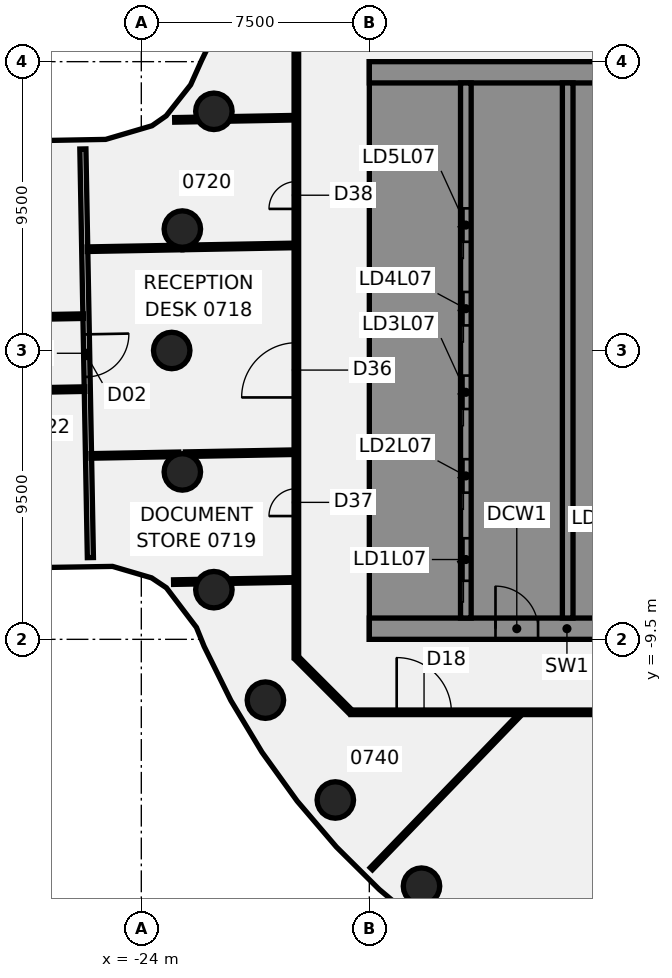
"""IFC4 building model, lengths in metres.
Left out: names, types, materials, properties, quantities, classifications, styles, units other than length and angle.
Written with IfcOpenShell. Run it as: python <this file> out.ifc"""

import sys

from ifc_helpers import new_model, si_unit, direction, frame, frame_2d, origin, origin_2d, place, context, subcontext, project, spatial, polyline, rectangle, circle, outline, extrude, element, fill, save


model = new_model("IFC4")
c1 = context("Model", 3, precision=1e-05, world=origin(), true_north=direction((0.0, 1.0)))
c2 = subcontext(c1, "Body", "Model", "MODEL_VIEW")
j1 = project(units=[si_unit("LENGTHUNIT", "METRE"), si_unit("PLANEANGLEUNIT", "RADIAN")], contexts=[c1])
p1 = place(None, origin())
s1 = spatial("IfcSite", under=j1, at=p1, CompositionType="ELEMENT")
p2 = place(p1, origin())
s2 = spatial("IfcBuilding", under=s1, at=p2, CompositionType="ELEMENT")
p3 = place(p2, frame((0.0, 0.0, 37.75)))
s3 = spatial("IfcBuildingStorey", under=s2, at=p3, CompositionType="ELEMENT", Elevation=37.75)
for number, where, z_axis, x_axis in (
    (1, (-21.613, 7.866, -0.14), (0.0, 0.0, 1.0), (1.0, 0.0, 0.0)),
    (2, (-22.651, 3.994, -0.14), (0.0, 0.0, 1.0), (1.0, 0.0, 0.0)),
    (3, (-23.0, 0.0, -0.14), (0.0, 0.0, 1.0), (1.0, 0.0, 0.0)),
    (4, (-22.651, -3.994, -0.14), (0.0, 0.0, 1.0), (1.0, 0.0, 0.0)),
    (5, (-21.613, -7.866, -0.14), (0.0, 0.0, 1.0), (1.0, 0.0, 0.0)),
    (6, (-19.919, -11.5, -0.14), (0.0, 0.0, 1.0), (1.0, 0.0, 0.0)),
    (7, (-17.619, -14.784, -0.14), (0.0, 0.0, 1.0), (1.0, 0.0, 0.0)),
    (8, (-14.784, -17.619, -0.14), (0.0, 0.0, 1.0), (1.0, 0.0, 0.0)),
):
    element("IfcColumn", number, at=place(p3, frame(where, z_axis=z_axis, x_axis=x_axis)), inside=s3, PredefinedType="COLUMN", context=c2, shape_type="SweptSolid", body=[
        extrude(circle(Radius=0.6, at=origin_2d()), origin(), (0.0, 0.0, 1.0), 3.75),
    ])
p4 = place(p3, frame((-25.922, 6.629, 0.0), z_axis=(0.0, 0.0, 1.0), x_axis=(0.018380182435, -0.999831070178, 0.0)))
e9 = element("IfcWall", 9, at=p4, inside=s3, PredefinedType="PARTITIONING", context=c2, shape_type="SweptSolid", body=[
    extrude(rectangle(XDim=13.442, YDim=0.2, at=frame_2d((6.721, 0.0))), origin(), (0.0, 0.0, 1.0), 3.01),
])
p5 = place(p4, frame((6.098, 0.0, 0.0)))
e10 = element("IfcOpeningElement", 10, at=p5, cuts=e9, PredefinedType="OPENING", context=c2, shape_type="SweptSolid", body=[
    extrude(rectangle(XDim=1.4, YDim=2.1, at=frame_2d((0.7, 1.05))), frame((0.0, 0.11, 0.0), z_axis=(0.0, -1.0, 0.0), x_axis=(1.0, 0.0, 0.0)), (0.0, 0.0, 1.0), 0.22),
])
p6 = place(p3, frame((-18.872, -10.128, 0.0), z_axis=(0.0, 0.0, 1.0), x_axis=(0.707106781187, -0.707106781187, 0.0)))
e11 = element("IfcWall", 11, at=p6, inside=s3, PredefinedType="PARTITIONING", context=c2, shape_type="SweptSolid", body=[
    extrude(rectangle(XDim=2.465, YDim=0.15, at=frame_2d((1.232, 0.0))), origin(), (0.0, 0.0, 1.0), 3.01),
])
p7 = place(p3, frame((-17.1, -11.9, 0.0), z_axis=(0.0, 0.0, 1.0), x_axis=(1.0, 0.0, 0.0)))
e12 = element("IfcWall", 12, at=p7, inside=s3, PredefinedType="PARTITIONING", context=c2, shape_type="SweptSolid", body=[
    extrude(rectangle(XDim=34.165, YDim=0.15, at=frame_2d((17.083, 0.0))), origin(), (0.0, 0.0, 1.0), 3.01),
])
p8 = place(p7, frame((16.065, 0.0, 0.0)))
e13 = element("IfcOpeningElement", 13, at=p8, cuts=e12, PredefinedType="OPENING", context=c2, shape_type="SweptSolid", body=[
    extrude(rectangle(XDim=1.8, YDim=2.1, at=frame_2d((0.9, 1.05))), frame((0.0, 0.085, 0.0), z_axis=(0.0, -1.0, 0.0), x_axis=(1.0, 0.0, 0.0)), (0.0, 0.0, 1.0), 0.17),
])
p9 = place(p7, frame((1.5, 0.0, 0.0)))
e14 = element("IfcOpeningElement", 14, at=p9, cuts=e12, PredefinedType="OPENING", context=c2, shape_type="SweptSolid", body=[
    extrude(rectangle(XDim=1.8, YDim=2.1, at=frame_2d((0.9, 1.05))), frame((0.0, 0.085, 0.0), z_axis=(0.0, -1.0, 0.0), x_axis=(1.0, 0.0, 0.0)), (0.0, 0.0, 1.0), 0.17),
])
p10 = place(p7, frame((26.617, 0.0, 0.0)))
e15 = element("IfcOpeningElement", 15, at=p10, cuts=e12, PredefinedType="OPENING", context=c2, shape_type="SweptSolid", body=[
    extrude(rectangle(XDim=1.8, YDim=2.1, at=frame_2d((0.9, 1.05))), frame((0.0, 0.085, 0.0), z_axis=(0.0, -1.0, 0.0), x_axis=(1.0, 0.0, 0.0)), (0.0, 0.0, 1.0), 0.17),
])
p11 = place(p3, frame((-29.78, 1.059, 0.0), z_axis=(0.0, 0.0, 1.0), x_axis=(0.999833060881, 0.01827157273, 0.0)))
e16 = element("IfcWall", 16, at=p11, inside=s3, PredefinedType="PARTITIONING", context=c2, shape_type="SweptSolid", body=[
    extrude(rectangle(XDim=3.875, YDim=0.15, at=frame_2d((1.938, 0.0))), origin(), (0.0, 0.0, 1.0), 3.01),
])
p12 = place(p3, frame((-43.714, -1.596, 0.0), z_axis=(0.0, 0.0, 1.0), x_axis=(0.999833878459, 0.018226779355, 0.0)))
e17 = element("IfcWall", 17, at=p12, inside=s3, PredefinedType="PARTITIONING", context=c2, shape_type="SweptSolid", body=[
    extrude(rectangle(XDim=17.855, YDim=0.15, at=frame_2d((8.927, 0.0))), origin(), (0.0, 0.0, 1.0), 3.01),
])
p13 = place(p12, frame((11.79, 0.0, 0.0)))
e18 = element("IfcOpeningElement", 18, at=p13, cuts=e17, PredefinedType="OPENING", context=c2, shape_type="SweptSolid", body=[
    extrude(rectangle(XDim=0.9, YDim=2.1, at=frame_2d((0.45, 1.05))), frame((0.0, 0.085, 0.0), z_axis=(0.0, -1.0, 0.0), x_axis=(1.0, 0.0, 0.0)), (0.0, 0.0, 1.0), 0.17),
])
p14 = place(p12, frame((5.19, 0.0, 0.0)))
e19 = element("IfcOpeningElement", 19, at=p14, cuts=e17, PredefinedType="OPENING", context=c2, shape_type="SweptSolid", body=[
    extrude(rectangle(XDim=0.9, YDim=2.1, at=frame_2d((0.45, 1.05))), frame((0.0, 0.085, 0.0), z_axis=(0.0, -1.0, 0.0), x_axis=(1.0, 0.0, 0.0)), (0.0, 0.0, 1.0), 0.17),
])
p15 = place(p3, frame((-25.776, 3.332, 0.0), z_axis=(0.0, 0.0, 1.0), x_axis=(0.999834076392, 0.018215918464, 0.0)))
e20 = element("IfcWall", 20, at=p15, inside=s3, PredefinedType="PARTITIONING", context=c2, shape_type="SweptSolid", body=[
    extrude(rectangle(XDim=3.109, YDim=0.15, at=frame_2d((1.555, 0.0))), origin(), (0.0, 0.0, 1.0), 3.01),
])
p16 = place(p3, frame((-22.632, 3.389, 0.0), z_axis=(0.0, 0.0, 1.0), x_axis=(0.999834091985, 0.01821506258, 0.0)))
e21 = element("IfcWall", 21, at=p16, inside=s3, PredefinedType="PARTITIONING", context=c2, shape_type="SweptSolid", body=[
    extrude(rectangle(XDim=3.672, YDim=0.15, at=frame_2d((1.836, 0.0))), origin(), (0.0, 0.0, 1.0), 3.01),
])
p17 = place(p3, frame((-25.652, -3.467, 0.0), z_axis=(0.0, 0.0, 1.0), x_axis=(0.999834723768, 0.01818035061, 0.0)))
e22 = element("IfcWall", 22, at=p17, inside=s3, PredefinedType="PARTITIONING", context=c2, shape_type="SweptSolid", body=[
    extrude(rectangle(XDim=2.887, YDim=0.15, at=frame_2d((1.444, 0.0))), origin(), (0.0, 0.0, 1.0), 3.01),
])
p18 = place(p3, frame((-22.55, -3.411, 0.0), z_axis=(0.0, 0.0, 1.0), x_axis=(0.999833986919, 0.018220828811, 0.0)))
e23 = element("IfcWall", 23, at=p18, inside=s3, PredefinedType="PARTITIONING", context=c2, shape_type="SweptSolid", body=[
    extrude(rectangle(XDim=3.591, YDim=0.15, at=frame_2d((1.795, 0.0))), origin(), (0.0, 0.0, 1.0), 3.01),
])
p19 = place(p3, frame((-22.938, -7.618, 0.0), z_axis=(0.0, 0.0, 1.0), x_axis=(0.999837513229, 0.01802629026, 0.0)))
e24 = element("IfcWall", 24, at=p19, inside=s3, PredefinedType="PARTITIONING", context=c2, shape_type="SweptSolid", body=[
    extrude(rectangle(XDim=0.786, YDim=0.15, at=frame_2d((0.393, 0.0))), origin(), (0.0, 0.0, 1.0), 3.01),
])
p20 = place(p3, frame((-21.079, -7.584, 0.0), z_axis=(0.0, 0.0, 1.0), x_axis=(0.999836384885, 0.018088766124, 0.0)))
e25 = element("IfcWall", 25, at=p20, inside=s3, PredefinedType="PARTITIONING", context=c2, shape_type="SweptSolid", body=[
    extrude(rectangle(XDim=2.119, YDim=0.15, at=frame_2d((1.06, 0.0))), origin(), (0.0, 0.0, 1.0), 3.01),
])
p21 = place(p3, frame((-22.903, 7.585, 0.0), z_axis=(0.0, 0.0, 1.0), x_axis=(0.999834536949, 0.018190621855, 0.0)))
e26 = element("IfcWall", 26, at=p21, inside=s3, PredefinedType="PARTITIONING", context=c2, shape_type="SweptSolid", body=[
    extrude(rectangle(XDim=0.752, YDim=0.15, at=frame_2d((0.376, 0.0))), origin(), (0.0, 0.0, 1.0), 3.01),
])
p22 = place(p3, frame((-21.069, 7.618, 0.0), z_axis=(0.0, 0.0, 1.0), x_axis=(0.999832834064, 0.018283980067, 0.0)))
e27 = element("IfcWall", 27, at=p22, inside=s3, PredefinedType="PARTITIONING", context=c2, shape_type="SweptSolid", body=[
    extrude(rectangle(XDim=2.11, YDim=0.15, at=frame_2d((1.055, 0.0))), origin(), (0.0, 0.0, 1.0), 3.01),
])
p23 = place(p3, frame((-16.434, -17.044, 0.0), z_axis=(0.0, 0.0, 1.0), x_axis=(0.694105968041, 0.719872839556, 0.0)))
e28 = element("IfcWall", 28, at=p23, inside=s3, PredefinedType="PARTITIONING", context=c2, shape_type="SweptSolid", body=[
    extrude(rectangle(XDim=7.021, YDim=0.1, at=frame_2d((3.51, 0.0))), origin(), (0.0, 0.0, 1.0), 3.01),
])
p24 = place(p3, frame((-18.9, -10.1, 0.0), z_axis=(0.0, 0.0, 1.0), x_axis=(0.0, 1.0, 0.0)))
e29 = element("IfcWall", 29, at=p24, inside=s3, PredefinedType="PARTITIONING", context=c2, shape_type="SweptSolid", body=[
    extrude(rectangle(XDim=20.2, YDim=0.15, at=frame_2d((10.1, 0.0))), origin(), (0.0, 0.0, 1.0), 3.01),
])
p25 = place(p24, frame((8.556, 0.0, 0.0)))
e30 = element("IfcOpeningElement", 30, at=p25, cuts=e29, PredefinedType="OPENING", context=c2, shape_type="SweptSolid", body=[
    extrude(rectangle(XDim=1.8, YDim=2.1, at=frame_2d((0.9, 1.05))), frame((0.0, 0.085, 0.0), z_axis=(0.0, -1.0, 0.0), x_axis=(1.0, 0.0, 0.0)), (0.0, 0.0, 1.0), 0.17),
])
p26 = place(p24, frame((4.655, 0.0, 0.0)))
e31 = element("IfcOpeningElement", 31, at=p26, cuts=e29, PredefinedType="OPENING", context=c2, shape_type="SweptSolid", body=[
    extrude(rectangle(XDim=0.9, YDim=2.1, at=frame_2d((0.45, 1.05))), frame((0.0, 0.085, 0.0), z_axis=(0.0, -1.0, 0.0), x_axis=(1.0, 0.0, 0.0)), (0.0, 0.0, 1.0), 0.17),
])
p27 = place(p24, frame((14.757, 0.0, 0.0)))
e32 = element("IfcOpeningElement", 32, at=p27, cuts=e29, PredefinedType="OPENING", context=c2, shape_type="SweptSolid", body=[
    extrude(rectangle(XDim=0.9, YDim=2.1, at=frame_2d((0.45, 1.05))), frame((0.0, 0.085, 0.0), z_axis=(0.0, -1.0, 0.0), x_axis=(1.0, 0.0, 0.0)), (0.0, 0.0, 1.0), 0.17),
])
p28 = place(p3, frame((-16.5, -9.15, 0.0), z_axis=(0.0, 0.0, 1.0), x_axis=(1.0, 0.0, 0.0)))
e33 = element("IfcWall", 33, at=p28, inside=s3, PredefinedType="SHEAR", context=c2, shape_type="SweptSolid", body=[
    extrude(rectangle(XDim=13.0, YDim=0.7, at=frame_2d((6.5, 0.0))), origin(), (0.0, 0.0, 1.0), 3.61),
])
p29 = place(p28, frame((4.15, 0.0, 0.0)))
e34 = element("IfcOpeningElement", 34, at=p29, cuts=e33, PredefinedType="OPENING", context=c2, shape_type="SweptSolid", body=[
    extrude(rectangle(XDim=1.4, YDim=2.1, at=frame_2d((0.7, 1.05))), frame((0.0, 0.36, 0.0), z_axis=(0.0, -1.0, 0.0), x_axis=(1.0, 0.0, 0.0)), (0.0, 0.0, 1.0), 0.72),
])
p30 = place(p28, frame((10.125, 0.0, 0.0)))
e35 = element("IfcOpeningElement", 35, at=p30, cuts=e33, PredefinedType="OPENING", context=c2, shape_type="SweptSolid", body=[
    extrude(rectangle(XDim=1.4, YDim=2.1, at=frame_2d((0.7, 1.05))), frame((0.0, 0.36, 0.0), z_axis=(0.0, -1.0, 0.0), x_axis=(1.0, 0.0, 0.0)), (0.0, 0.0, 1.0), 0.72),
])
p31 = place(p3, origin())
e36 = element("IfcWall", 36, at=p31, inside=s3, PredefinedType="SHEAR", context=c2, shape_type="SweptSolid", body=[
    extrude(outline(polyline([(-13.5, -8.8), (-13.5, -8.125), (-15.8, -8.125), (-15.8, -5.625), (-13.5, -5.625), (-13.5, -5.375), (-15.8, -5.375), (-15.8, -2.875), (-13.5, -2.875), (-13.5, -2.625), (-15.8, -2.625), (-15.8, -0.125), (-13.5, -0.125), (-13.5, 0.125), (-15.8, 0.125), (-15.8, 2.625), (-13.5, 2.625), (-13.5, 2.875), (-15.8, 2.875), (-15.8, 5.375), (-13.5, 5.375), (-13.5, 5.625), (-15.8, 5.625), (-15.8, 8.125), (-13.5, 8.125), (-13.5, 8.8), (-15.8, 8.8), (-16.5, 8.8), (-16.5, -8.8), (-15.8, -8.8), (-13.5, -8.8)])), origin(), (0.0, 0.0, 1.0), 3.61),
])
p32 = place(p3, frame((-16.5, 9.15, 0.0), z_axis=(0.0, 0.0, 1.0), x_axis=(1.0, 0.0, 0.0)))
e37 = element("IfcWall", 37, at=p32, inside=s3, PredefinedType="SHEAR", context=c2, shape_type="SweptSolid", body=[
    extrude(rectangle(XDim=13.0, YDim=0.7, at=frame_2d((6.5, 0.0))), origin(), (0.0, 0.0, 1.0), 3.61),
])
p33 = place(p3, origin())
e38 = element("IfcWall", 38, at=p33, inside=s3, PredefinedType="SHEAR", context=c2, shape_type="SweptSolid", body=[
    extrude(outline(polyline([(-9.8, -5.375), (-9.8, -5.625), (-7.5, -5.625), (-7.15, -5.625), (-7.15, 8.8), (-7.5, 8.8), (-9.8, 8.8), (-9.8, 8.125), (-7.5, 8.125), (-7.5, 5.625), (-9.8, 5.625), (-9.8, 5.375), (-7.5, 5.375), (-7.5, 2.875), (-9.8, 2.875), (-9.8, 2.625), (-7.5, 2.625), (-7.5, 0.125), (-9.8, 0.125), (-9.8, -0.125), (-7.5, -0.125), (-7.5, -2.625), (-9.8, -2.625), (-9.8, -2.875), (-7.5, -2.875), (-7.5, -5.375), (-9.8, -5.375)])), origin(), (0.0, 0.0, 1.0), 3.61),
])
p34 = place(p3, origin())
e39 = element("IfcWall", 39, at=p34, inside=s3, PredefinedType="SHEAR", context=c2, shape_type="SweptSolid", body=[
    extrude(outline(polyline([(-7.5, -8.125), (-9.55, -8.125), (-9.55, -5.625), (-9.8, -5.625), (-9.8, -8.125), (-9.8, -8.8), (-7.5, -8.8), (-7.5, -8.125)])), origin(), (0.0, 0.0, 1.0), 3.61),
])
p35 = place(p3, frame((-13.325, -8.8, 0.0), z_axis=(0.0, 0.0, 1.0), x_axis=(0.0, 1.0, 0.0)))
e40 = element("IfcWall", 40, at=p35, inside=s3, PredefinedType="SHEAR", context=c2, shape_type="SweptSolid", body=[
    extrude(rectangle(XDim=17.6, YDim=0.35, at=frame_2d((8.8, 0.0))), origin(), (0.0, 0.0, 1.0), 3.61),
])
p36 = place(p35, frame((1.225, 0.0, 0.0)))
e41 = element("IfcOpeningElement", 41, at=p36, cuts=e40, PredefinedType="OPENING", context=c2, shape_type="SweptSolid", body=[
    extrude(rectangle(XDim=1.4, YDim=2.1, at=frame_2d((0.7, 1.05))), frame((0.0, 0.185, 0.0), z_axis=(0.0, -1.0, 0.0), x_axis=(1.0, 0.0, 0.0)), (0.0, 0.0, 1.0), 0.37),
])
p37 = place(p35, frame((4.125, 0.0, 0.0)))
e42 = element("IfcOpeningElement", 42, at=p37, cuts=e40, PredefinedType="OPENING", context=c2, shape_type="SweptSolid", body=[
    extrude(rectangle(XDim=1.1, YDim=2.1, at=frame_2d((0.55, 1.05))), frame((0.0, 0.185, 0.0), z_axis=(0.0, -1.0, 0.0), x_axis=(1.0, 0.0, 0.0)), (0.0, 0.0, 1.0), 0.37),
])
p38 = place(p35, frame((6.875, 0.0, 0.0)))
e43 = element("IfcOpeningElement", 43, at=p38, cuts=e40, PredefinedType="OPENING", context=c2, shape_type="SweptSolid", body=[
    extrude(rectangle(XDim=1.1, YDim=2.1, at=frame_2d((0.55, 1.05))), frame((0.0, 0.185, 0.0), z_axis=(0.0, -1.0, 0.0), x_axis=(1.0, 0.0, 0.0)), (0.0, 0.0, 1.0), 0.37),
])
p39 = place(p35, frame((9.625, 0.0, 0.0)))
e44 = element("IfcOpeningElement", 44, at=p39, cuts=e40, PredefinedType="OPENING", context=c2, shape_type="SweptSolid", body=[
    extrude(rectangle(XDim=1.1, YDim=2.1, at=frame_2d((0.55, 1.05))), frame((0.0, 0.185, 0.0), z_axis=(0.0, -1.0, 0.0), x_axis=(1.0, 0.0, 0.0)), (0.0, 0.0, 1.0), 0.37),
])
p40 = place(p35, frame((12.375, 0.0, 0.0)))
e45 = element("IfcOpeningElement", 45, at=p40, cuts=e40, PredefinedType="OPENING", context=c2, shape_type="SweptSolid", body=[
    extrude(rectangle(XDim=1.1, YDim=2.1, at=frame_2d((0.55, 1.05))), frame((0.0, 0.185, 0.0), z_axis=(0.0, -1.0, 0.0), x_axis=(1.0, 0.0, 0.0)), (0.0, 0.0, 1.0), 0.37),
])
p41 = place(p3, frame((-9.975, -8.8, 0.0), z_axis=(0.0, 0.0, 1.0), x_axis=(0.0, 1.0, 0.0)))
e46 = element("IfcWall", 46, at=p41, inside=s3, PredefinedType="SHEAR", context=c2, shape_type="SweptSolid", body=[
    extrude(rectangle(XDim=17.6, YDim=0.35, at=frame_2d((8.8, 0.0))), origin(), (0.0, 0.0, 1.0), 3.61),
])
p42 = place(p5, origin())
e47 = element("IfcDoor", 47, at=p42, inside=s3, OperationType="DOUBLE_DOOR_SINGLE_SWING", PredefinedType="DOOR", context=c2, shape_type="SweptSolid", body=[
    extrude(rectangle(XDim=1.4, YDim=2.1, at=frame_2d((0.7, 1.05))), frame((0.0, 0.025, 0.0), z_axis=(0.0, -1.0, 0.0), x_axis=(1.0, 0.0, 0.0)), (0.0, 0.0, 1.0), 0.05),
])
fill(e10, e47)
p43 = place(p9, frame((1.8, 0.0, 0.0), z_axis=(0.0, 0.0, 1.0), x_axis=(-1.0, 0.0, 0.0)))
e48 = element("IfcDoor", 48, at=p43, inside=s3, OperationType="DOUBLE_DOOR_SINGLE_SWING", PredefinedType="DOOR", context=c2, shape_type="SweptSolid", body=[
    extrude(rectangle(XDim=1.8, YDim=2.1, at=frame_2d((0.9, 1.05))), frame((0.0, 0.025, 0.0), z_axis=(0.0, -1.0, 0.0), x_axis=(1.0, 0.0, 0.0)), (0.0, 0.0, 1.0), 0.05),
])
fill(e14, e48)
p44 = place(p25, frame((1.8, 0.0, 0.0), z_axis=(0.0, 0.0, 1.0), x_axis=(-1.0, 0.0, 0.0)))
e49 = element("IfcDoor", 49, at=p44, inside=s3, OperationType="DOUBLE_DOOR_SINGLE_SWING", PredefinedType="DOOR", context=c2, shape_type="SweptSolid", body=[
    extrude(rectangle(XDim=1.8, YDim=2.1, at=frame_2d((0.9, 1.05))), frame((0.0, 0.025, 0.0), z_axis=(0.0, -1.0, 0.0), x_axis=(1.0, 0.0, 0.0)), (0.0, 0.0, 1.0), 0.05),
])
fill(e30, e49)
p45 = place(p26, origin())
e50 = element("IfcDoor", 50, at=p45, inside=s3, OperationType="SINGLE_SWING_RIGHT", PredefinedType="DOOR", context=c2, shape_type="SweptSolid", body=[
    extrude(rectangle(XDim=0.9, YDim=2.1, at=frame_2d((0.45, 1.05))), frame((0.0, 0.025, 0.0), z_axis=(0.0, -1.0, 0.0), x_axis=(1.0, 0.0, 0.0)), (0.0, 0.0, 1.0), 0.05),
])
fill(e31, e50)
p46 = place(p27, origin())
e51 = element("IfcDoor", 51, at=p46, inside=s3, OperationType="SINGLE_SWING_LEFT", PredefinedType="DOOR", context=c2, shape_type="SweptSolid", body=[
    extrude(rectangle(XDim=0.9, YDim=2.1, at=frame_2d((0.45, 1.05))), frame((0.0, 0.025, 0.0), z_axis=(0.0, -1.0, 0.0), x_axis=(1.0, 0.0, 0.0)), (0.0, 0.0, 1.0), 0.05),
])
fill(e32, e51)
p47 = place(p29, origin())
e52 = element("IfcDoor", 52, at=p47, inside=s3, OperationType="SINGLE_SWING_LEFT", PredefinedType="DOOR", context=c2, shape_type="SweptSolid", body=[
    extrude(rectangle(XDim=1.4, YDim=2.1, at=frame_2d((0.7, 1.05))), frame((0.0, 0.025, 0.0), z_axis=(0.0, -1.0, 0.0), x_axis=(1.0, 0.0, 0.0)), (0.0, 0.0, 1.0), 0.05),
])
fill(e34, e52)
p48 = place(p36, origin())
e53 = element("IfcDoor", 53, at=p48, inside=s3, OperationType="SLIDING_TO_LEFT", PredefinedType="DOOR", context=c2, shape_type="SweptSolid", body=[
    extrude(rectangle(XDim=1.4, YDim=2.1, at=frame_2d((0.7, 1.05))), frame((0.0, 0.025, 0.0), z_axis=(0.0, -1.0, 0.0), x_axis=(1.0, 0.0, 0.0)), (0.0, 0.0, 1.0), 0.05),
])
fill(e41, e53)
p49 = place(p37, origin())
e54 = element("IfcDoor", 54, at=p49, inside=s3, OperationType="SLIDING_TO_LEFT", PredefinedType="DOOR", context=c2, shape_type="SweptSolid", body=[
    extrude(rectangle(XDim=1.1, YDim=2.1, at=frame_2d((0.55, 1.05))), frame((0.0, 0.025, 0.0), z_axis=(0.0, -1.0, 0.0), x_axis=(1.0, 0.0, 0.0)), (0.0, 0.0, 1.0), 0.05),
])
fill(e42, e54)
p50 = place(p38, origin())
e55 = element("IfcDoor", 55, at=p50, inside=s3, OperationType="SLIDING_TO_LEFT", PredefinedType="DOOR", context=c2, shape_type="SweptSolid", body=[
    extrude(rectangle(XDim=1.1, YDim=2.1, at=frame_2d((0.55, 1.05))), frame((0.0, 0.025, 0.0), z_axis=(0.0, -1.0, 0.0), x_axis=(1.0, 0.0, 0.0)), (0.0, 0.0, 1.0), 0.05),
])
fill(e43, e55)
p51 = place(p39, origin())
e56 = element("IfcDoor", 56, at=p51, inside=s3, OperationType="SLIDING_TO_LEFT", PredefinedType="DOOR", context=c2, shape_type="SweptSolid", body=[
    extrude(rectangle(XDim=1.1, YDim=2.1, at=frame_2d((0.55, 1.05))), frame((0.0, 0.025, 0.0), z_axis=(0.0, -1.0, 0.0), x_axis=(1.0, 0.0, 0.0)), (0.0, 0.0, 1.0), 0.05),
])
fill(e44, e56)
p52 = place(p40, origin())
e57 = element("IfcDoor", 57, at=p52, inside=s3, OperationType="SLIDING_TO_LEFT", PredefinedType="DOOR", context=c2, shape_type="SweptSolid", body=[
    extrude(rectangle(XDim=1.1, YDim=2.1, at=frame_2d((0.55, 1.05))), frame((0.0, 0.025, 0.0), z_axis=(0.0, -1.0, 0.0), x_axis=(1.0, 0.0, 0.0)), (0.0, 0.0, 1.0), 0.05),
])
fill(e45, e57)
save(model, sys.argv[1])
